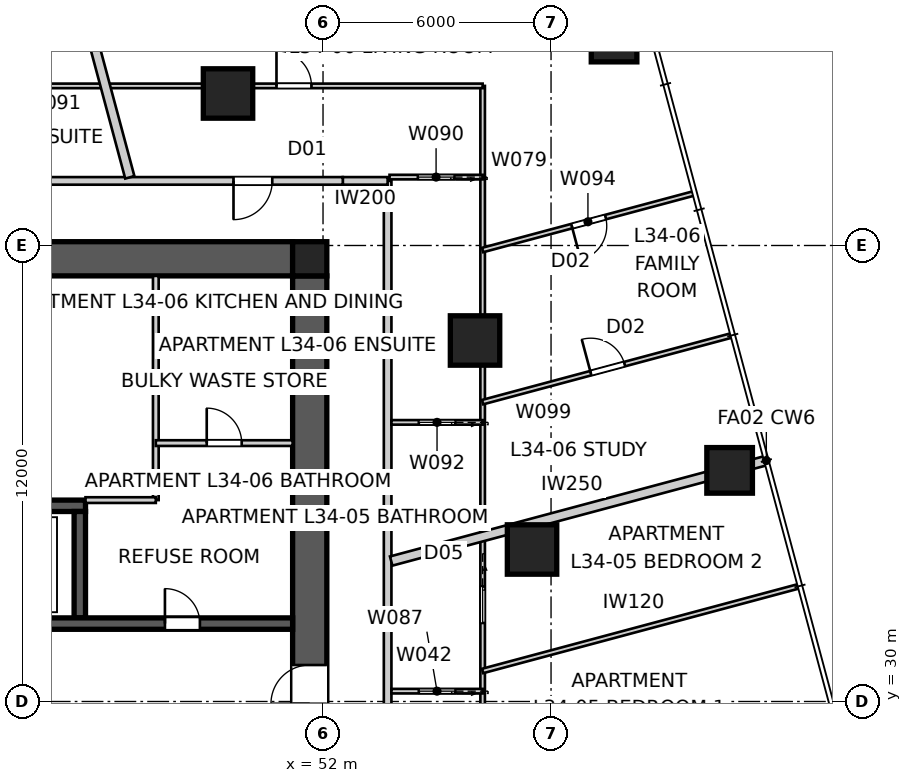
"""IFC4 building model, lengths in metres.
Left out: names, types, materials, properties, quantities, classifications, styles, units other than length and angle.
Written with IfcOpenShell. Run it as: python <this file> out.ifc"""

import sys

from ifc_helpers import new_model, si_unit, direction, frame, frame_2d, origin, origin_2d, place, context, subcontext, project, spatial, polyline, rectangle, outline, extrude, element, fill, save


model = new_model("IFC4")
c1 = context("Model", 3, precision=1e-05, world=origin(), true_north=direction((0.0, 1.0)))
c2 = subcontext(c1, "Body", "Model", "MODEL_VIEW")
j1 = project(units=[si_unit("LENGTHUNIT", "METRE"), si_unit("PLANEANGLEUNIT", "RADIAN")], contexts=[c1])
p1 = place(None, origin())
s1 = spatial("IfcSite", under=j1, at=p1, CompositionType="ELEMENT")
p2 = place(p1, origin())
s2 = spatial("IfcBuilding", under=s1, at=p2, CompositionType="ELEMENT")
p3 = place(p2, frame((0.0, 0.0, 125.2)))
s3 = spatial("IfcBuildingStorey", under=s2, at=p3, CompositionType="ELEMENT", Elevation=125.2)
p4 = place(p3, frame((28.8, 41.65, 0.0), z_axis=(0.0, 0.0, 1.0), x_axis=(1.0, 0.0, 0.0)))
e1 = element("IfcWall", 1, at=p4, inside=s3, PredefinedType="SHEAR", context=c2, shape_type="SweptSolid", body=[
    extrude(outline(polyline([(0.0, -0.45), (22.4, -0.45), (22.4, -0.025), (22.85, -0.025), (22.85, 0.025), (22.4, 0.025), (22.4, 0.45), (0.0, 0.45), (0.0, 0.025), (-0.45, 0.025), (-0.45, -0.025), (0.0, -0.025), (0.0, -0.45)])), origin(), (0.0, 0.0, 1.0), 3.4),
])
p5 = place(p3, frame((51.65, 18.8, 0.0), z_axis=(0.0, 0.0, 1.0), x_axis=(0.0, 1.0, 0.0)))
e2 = element("IfcWall", 2, at=p5, inside=s3, PredefinedType="SHEAR", context=c2, shape_type="SweptSolid", body=[
    extrude(outline(polyline([(0.0, -0.45), (22.4, -0.45), (22.4, -0.025), (22.85, -0.025), (22.85, 0.025), (22.4, 0.025), (22.4, 0.45), (0.0, 0.45), (0.0, 0.025), (-0.45, 0.025), (-0.45, -0.025), (0.0, -0.025), (0.0, -0.45)])), origin(), (0.0, 0.0, 1.0), 3.4),
])
p6 = place(p5, frame((11.14, 0.0, 0.0)))
e3 = element("IfcOpeningElement", 3, at=p6, cuts=e2, PredefinedType="OPENING", context=c2, shape_type="SweptSolid", body=[
    extrude(rectangle(XDim=1.02, YDim=2.4, at=frame_2d((0.51, 1.2))), frame((0.0, 0.46, 0.0), z_axis=(0.0, -1.0, 0.0), x_axis=(1.0, 0.0, 0.0)), (0.0, 0.0, 1.0), 0.92),
])
p7 = place(p3, frame((28.8, 32.05, 0.0), z_axis=(0.0, 0.0, 1.0), x_axis=(1.0, 0.0, 0.0)))
e4 = element("IfcWall", 4, at=p7, inside=s3, PredefinedType="SHEAR", context=c2, shape_type="SweptSolid", body=[
    extrude(rectangle(XDim=22.4, YDim=0.3, at=frame_2d((11.2, 0.0))), origin(), (0.0, 0.0, 1.0), 3.4),
])
p8 = place(p7, frame((19.04, 0.0, 0.0)))
e5 = element("IfcOpeningElement", 5, at=p8, cuts=e4, PredefinedType="OPENING", context=c2, shape_type="SweptSolid", body=[
    extrude(rectangle(XDim=0.92, YDim=2.1, at=frame_2d((0.46, 1.05))), frame((0.0, 0.16, 0.0), z_axis=(0.0, -1.0, 0.0), x_axis=(1.0, 0.0, 0.0)), (0.0, 0.0, 1.0), 0.32),
])
p9 = place(p7, frame((1.265, 0.0, 0.0)))
e6 = element("IfcOpeningElement", 6, at=p9, cuts=e4, PredefinedType="OPENING", context=c2, shape_type="SweptSolid", body=[
    extrude(rectangle(XDim=1.02, YDim=2.1, at=frame_2d((0.51, 1.05))), frame((0.0, 0.16, 0.0), z_axis=(0.0, -1.0, 0.0), x_axis=(1.0, 0.0, 0.0)), (0.0, 0.0, 1.0), 0.32),
])
p10 = place(p7, frame((4.015, 0.0, 0.0)))
e7 = element("IfcOpeningElement", 7, at=p10, cuts=e4, PredefinedType="OPENING", context=c2, shape_type="SweptSolid", body=[
    extrude(rectangle(XDim=0.92, YDim=2.1, at=frame_2d((0.46, 1.05))), frame((0.0, 0.16, 0.0), z_axis=(0.0, -1.0, 0.0), x_axis=(1.0, 0.0, 0.0)), (0.0, 0.0, 1.0), 0.32),
])
p11 = place(p7, frame((6.45, 0.0, 0.0)))
e8 = element("IfcOpeningElement", 8, at=p11, cuts=e4, PredefinedType="OPENING", context=c2, shape_type="SweptSolid", body=[
    extrude(rectangle(XDim=1.1, YDim=2.1, at=frame_2d((0.55, 1.05))), frame((0.0, 0.16, 0.0), z_axis=(0.0, -1.0, 0.0), x_axis=(1.0, 0.0, 0.0)), (0.0, 0.0, 1.0), 0.32),
])
p12 = place(p7, frame((9.25, 0.0, 0.0)))
e9 = element("IfcOpeningElement", 9, at=p12, cuts=e4, PredefinedType="OPENING", context=c2, shape_type="SweptSolid", body=[
    extrude(rectangle(XDim=1.1, YDim=2.1, at=frame_2d((0.55, 1.05))), frame((0.0, 0.16, 0.0), z_axis=(0.0, -1.0, 0.0), x_axis=(1.0, 0.0, 0.0)), (0.0, 0.0, 1.0), 0.32),
])
p13 = place(p7, frame((14.85, 0.0, 0.0)))
e10 = element("IfcOpeningElement", 10, at=p13, cuts=e4, PredefinedType="OPENING", context=c2, shape_type="SweptSolid", body=[
    extrude(rectangle(XDim=1.1, YDim=2.1, at=frame_2d((0.55, 1.05))), frame((0.0, 0.16, 0.0), z_axis=(0.0, -1.0, 0.0), x_axis=(1.0, 0.0, 0.0)), (0.0, 0.0, 1.0), 0.32),
])
p14 = place(p3, frame((34.25, 35.15, 0.0), z_axis=(0.0, 0.0, 1.0), x_axis=(1.0, 0.0, 0.0)))
e11 = element("IfcWall", 11, at=p14, inside=s3, PredefinedType="SHEAR", context=c2, shape_type="SweptSolid", body=[
    extrude(rectangle(XDim=11.5, YDim=0.3, at=frame_2d((5.75, 0.0))), origin(), (0.0, 0.0, 1.0), 3.4),
])
p15 = place(p3, frame((45.6, 32.2, 0.0), z_axis=(0.0, 0.0, 1.0), x_axis=(0.0, 1.0, 0.0)))
e12 = element("IfcWall", 12, at=p15, inside=s3, PredefinedType="SHEAR", context=c2, shape_type="SweptSolid", body=[
    extrude(rectangle(XDim=2.8, YDim=0.3, at=frame_2d((1.4, 0.0))), origin(), (0.0, 0.0, 1.0), 3.4),
])
p16 = place(p3, frame((51.65, 41.65, 0.0), z_axis=(0.0, 0.0, 1.0), x_axis=(1.0, 0.0, 0.0)))
e13 = element("IfcColumn", 13, at=p16, inside=s3, PredefinedType="COLUMN", context=c2, shape_type="SweptSolid", body=[
    extrude(rectangle(XDim=0.9, YDim=0.9, at=origin_2d()), origin(), (0.0, 0.0, 1.0), 3.4),
])
for number, where, z_axis, x_axis in (
    (14, (62.699, 36.082, 0.0), (0.0, 0.0, 1.0), (1.0, 0.0, 0.0)),
    (15, (59.658, 47.432, 0.0), (0.0, 0.0, 1.0), (1.0, 0.0, 0.0)),
):
    element("IfcColumn", number, at=place(p3, frame(where, z_axis=z_axis, x_axis=x_axis)), inside=s3, PredefinedType="COLUMN", context=c2, shape_type="SweptSolid", body=[
        extrude(rectangle(XDim=1.2, YDim=1.2, at=origin_2d()), origin(), (0.0, 0.0, 1.0), 3.4),
    ])
for number, where, z_axis, x_axis in (
    (16, (57.5, 34.0, 0.0), (0.0, 0.0, 1.0), (1.0, 0.0, 0.0)),
    (17, (56.0, 39.5, 0.0), (0.0, 0.0, 1.0), (1.0, 0.0, 0.0)),
    (18, (49.5, 46.0, 0.0), (0.0, 0.0, 1.0), (1.0, 0.0, 0.0)),
):
    element("IfcColumn", number, at=place(p3, frame(where, z_axis=z_axis, x_axis=x_axis)), inside=s3, PredefinedType="COLUMN", context=c2, shape_type="SweptSolid", body=[
        extrude(rectangle(XDim=1.3, YDim=1.3, at=origin_2d()), origin(), (0.0, 0.0, 1.0), 3.4),
    ])
p17 = place(p3, frame((53.7, 17.48, 0.0), z_axis=(0.0, 0.0, 1.0), x_axis=(0.0, 1.0, 0.0)))
e19 = element("IfcWall", 19, at=p17, inside=s3, PredefinedType="PARTITIONING", context=c2, shape_type="SweptSolid", body=[
    extrude(rectangle(XDim=26.22, YDim=0.2, at=frame_2d((13.11, 0.0))), origin(), (0.0, 0.0, 1.0), 3.25),
])
p18 = place(p17, frame((2.252, 0.0, 0.0)))
e20 = element("IfcOpeningElement", 20, at=p18, cuts=e19, PredefinedType="OPENING", context=c2, shape_type="SweptSolid", body=[
    extrude(rectangle(XDim=1.02, YDim=2.34, at=frame_2d((0.51, 1.17))), frame((0.0, 0.11, 0.0), z_axis=(0.0, -1.0, 0.0), x_axis=(1.0, 0.0, 0.0)), (0.0, 0.0, 1.0), 0.22),
])
p19 = place(p17, frame((7.328, 0.0, 0.0)))
e21 = element("IfcOpeningElement", 21, at=p19, cuts=e19, PredefinedType="OPENING", context=c2, shape_type="SweptSolid", body=[
    extrude(rectangle(XDim=1.02, YDim=2.34, at=frame_2d((0.51, 1.17))), frame((0.0, 0.11, 0.0), z_axis=(0.0, -1.0, 0.0), x_axis=(1.0, 0.0, 0.0)), (0.0, 0.0, 1.0), 0.22),
])
p20 = place(p3, frame((53.7, 43.7, 0.0), z_axis=(0.0, 0.0, 1.0), x_axis=(-1.0, 0.0, 0.0)))
e22 = element("IfcWall", 22, at=p20, inside=s3, PredefinedType="PARTITIONING", context=c2, shape_type="SweptSolid", body=[
    extrude(rectangle(XDim=1.18, YDim=0.2, at=frame_2d((0.59, 0.0))), origin(), (0.0, 0.0, 1.0), 2.722),
])
p21 = place(p3, frame((52.52, 43.7, 0.0), z_axis=(0.0, 0.0, 1.0), x_axis=(-1.0, 0.0, 0.0)))
e23 = element("IfcWall", 23, at=p21, inside=s3, PredefinedType="PARTITIONING", context=c2, shape_type="SweptSolid", body=[
    extrude(rectangle(XDim=27.02, YDim=0.2, at=frame_2d((13.51, 0.0))), origin(), (0.0, 0.0, 1.0), 3.25),
])
p22 = place(p21, frame((22.208, 0.0, 0.0)))
e24 = element("IfcOpeningElement", 24, at=p22, cuts=e23, PredefinedType="OPENING", context=c2, shape_type="SweptSolid", body=[
    extrude(rectangle(XDim=1.02, YDim=2.34, at=frame_2d((0.51, 1.17))), frame((0.0, 0.11, 0.0), z_axis=(0.0, -1.0, 0.0), x_axis=(1.0, 0.0, 0.0)), (0.0, 0.0, 1.0), 0.22),
])
p23 = place(p21, frame((1.856, 0.0, 0.0)))
e25 = element("IfcOpeningElement", 25, at=p23, cuts=e23, PredefinedType="OPENING", context=c2, shape_type="SweptSolid", body=[
    extrude(rectangle(XDim=1.02, YDim=2.34, at=frame_2d((0.51, 1.17))), frame((0.0, 0.11, 0.0), z_axis=(0.0, -1.0, 0.0), x_axis=(1.0, 0.0, 0.0)), (0.0, 0.0, 1.0), 0.22),
])
p24 = place(p3, frame((63.665, 36.341, 0.0), z_axis=(0.0, 0.0, 1.0), x_axis=(-0.965927365002, -0.258813302479, 0.0)))
e26 = element("IfcWall", 26, at=p24, inside=s3, PredefinedType="PARTITIONING", context=c2, shape_type="SweptSolid", body=[
    extrude(rectangle(XDim=10.22, YDim=0.25, at=frame_2d((5.11, 0.0))), origin(), (0.0, 0.0, 1.0), 3.25),
])
p25 = place(p3, frame((43.56, 56.318, 0.0), z_axis=(0.0, 0.0, 1.0), x_axis=(0.258822671559, -0.965924854576, 0.0)))
e27 = element("IfcWall", 27, at=p25, inside=s3, PredefinedType="PARTITIONING", context=c2, shape_type="SweptSolid", body=[
    extrude(rectangle(XDim=12.966, YDim=0.25, at=frame_2d((6.483, 0.0))), origin(), (0.0, 0.0, 1.0), 3.25),
])
p26 = place(p3, frame((47.6, 41.2, 0.0), z_axis=(0.0, 0.0, 1.0), x_axis=(0.0, -1.0, 0.0)))
e28 = element("IfcWall", 28, at=p26, inside=s3, PredefinedType="SOLIDWALL", context=c2, shape_type="SweptSolid", body=[
    extrude(rectangle(XDim=5.9, YDim=0.15, at=frame_2d((2.95, 0.0))), origin(), (0.0, 0.0, 1.0), 3.25),
])
p27 = place(p3, frame((47.6, 35.3, 0.0), z_axis=(0.0, 0.0, 1.0), x_axis=(-1.0, 0.0, 0.0)))
e29 = element("IfcWall", 29, at=p27, inside=s3, PredefinedType="SOLIDWALL", context=c2, shape_type="SweptSolid", body=[
    extrude(rectangle(XDim=1.85, YDim=0.15, at=frame_2d((0.925, 0.0))), origin(), (0.0, 0.0, 1.0), 3.25),
])
p28 = place(p3, frame((47.6, 36.8, 0.0), z_axis=(0.0, 0.0, 1.0), x_axis=(1.0, 0.0, 0.0)))
e30 = element("IfcWall", 30, at=p28, inside=s3, PredefinedType="SOLIDWALL", context=c2, shape_type="SweptSolid", body=[
    extrude(rectangle(XDim=3.6, YDim=0.15, at=frame_2d((1.8, 0.0))), origin(), (0.0, 0.0, 1.0), 3.25),
])
p29 = place(p28, frame((1.34, 0.0, 0.0)))
e31 = element("IfcOpeningElement", 31, at=p29, cuts=e30, PredefinedType="OPENING", context=c2, shape_type="SweptSolid", body=[
    extrude(rectangle(XDim=0.92, YDim=2.1, at=frame_2d((0.46, 1.05))), frame((0.0, 0.085, 0.0), z_axis=(0.0, -1.0, 0.0), x_axis=(1.0, 0.0, 0.0)), (0.0, 0.0, 1.0), 0.17),
])
p30 = place(p3, frame((56.2, 46.2, 0.0), z_axis=(0.0, 0.0, 1.0), x_axis=(0.0, -1.0, 0.0)))
e32 = element("IfcWall", 32, at=p30, inside=s3, PredefinedType="PARTITIONING", context=c2, shape_type="SweptSolid", body=[
    extrude(rectangle(XDim=33.2, YDim=0.12, at=frame_2d((16.6, 0.0))), origin(), (0.0, 0.0, 1.0), 2.55),
])
p31 = place(p30, frame((23.955, 0.0, 0.0)))
e33 = element("IfcOpeningElement", 33, at=p31, cuts=e32, PredefinedType="OPENING", context=c2, shape_type="SweptSolid", body=[
    extrude(rectangle(XDim=0.92, YDim=2.34, at=frame_2d((0.46, 1.17))), frame((0.0, 0.07, 0.0), z_axis=(0.0, -1.0, 0.0), x_axis=(1.0, 0.0, 0.0)), (0.0, 0.0, 1.0), 0.14),
])
p32 = place(p30, frame((20.966, 0.0, 0.0)))
e34 = element("IfcOpeningElement", 34, at=p32, cuts=e32, PredefinedType="OPENING", context=c2, shape_type="SweptSolid", body=[
    extrude(rectangle(XDim=0.92, YDim=2.34, at=frame_2d((0.46, 1.17))), frame((0.0, 0.07, 0.0), z_axis=(0.0, -1.0, 0.0), x_axis=(1.0, 0.0, 0.0)), (0.0, 0.0, 1.0), 0.14),
])
p33 = place(p30, frame((13.174, 0.0, 0.0)))
e35 = element("IfcOpeningElement", 35, at=p33, cuts=e32, PredefinedType="OPENING", context=c2, shape_type="SweptSolid", body=[
    extrude(rectangle(XDim=0.96, YDim=2.1, at=frame_2d((0.48, 1.05))), frame((0.0, 0.07, 0.0), z_axis=(0.0, -1.0, 0.0), x_axis=(1.0, 0.0, 0.0)), (0.0, 0.0, 1.0), 0.14),
])
p34 = place(p3, frame((56.2, 30.272, 0.0), z_axis=(0.0, 0.0, 1.0), x_axis=(-1.0, 0.0, 0.0)))
e36 = element("IfcWall", 36, at=p34, inside=s3, PredefinedType="PARTITIONING", context=c2, shape_type="SweptSolid", body=[
    extrude(rectangle(XDim=2.4, YDim=0.12, at=frame_2d((1.2, 0.0))), origin(), (0.0, 0.0, 1.0), 3.25),
])
p35 = place(p34, frame((0.72, 0.0, 0.0)))
e37 = element("IfcOpeningElement", 37, at=p35, cuts=e36, PredefinedType="OPENING", context=c2, shape_type="SweptSolid", body=[
    extrude(rectangle(XDim=0.96, YDim=2.1, at=frame_2d((0.48, 1.05))), frame((0.0, 0.07, 0.0), z_axis=(0.0, -1.0, 0.0), x_axis=(1.0, 0.0, 0.0)), (0.0, 0.0, 1.0), 0.14),
])
p36 = place(p3, frame((56.2, 30.803, 0.0), z_axis=(0.0, 0.0, 1.0), x_axis=(0.965920565748, 0.258838676912, 0.0)))
e38 = element("IfcWall", 38, at=p36, inside=s3, PredefinedType="PARTITIONING", context=c2, shape_type="SweptSolid", body=[
    extrude(rectangle(XDim=8.604, YDim=0.12, at=frame_2d((4.302, 0.0))), origin(), (0.0, 0.0, 1.0), 3.25),
])
p37 = place(p3, frame((56.2, 43.8, 0.0), z_axis=(0.0, 0.0, 1.0), x_axis=(-1.0, 0.0, 0.0)))
e39 = element("IfcWall", 39, at=p37, inside=s3, PredefinedType="PARTITIONING", context=c2, shape_type="SweptSolid", body=[
    extrude(rectangle(XDim=2.45, YDim=0.12, at=frame_2d((1.225, 0.0))), origin(), (0.0, 0.0, 1.0), 2.722),
])
p38 = place(p37, frame((0.745, 0.0, 0.0)))
e40 = element("IfcOpeningElement", 40, at=p38, cuts=e39, PredefinedType="OPENING", context=c2, shape_type="SweptSolid", body=[
    extrude(rectangle(XDim=0.96, YDim=2.1, at=frame_2d((0.48, 1.05))), frame((0.0, 0.07, 0.0), z_axis=(0.0, -1.0, 0.0), x_axis=(1.0, 0.0, 0.0)), (0.0, 0.0, 1.0), 0.14),
])
p39 = place(p3, frame((23.0, 46.2, 0.0), z_axis=(0.0, 0.0, 1.0), x_axis=(1.0, 0.0, 0.0)))
e41 = element("IfcWall", 41, at=p39, inside=s3, PredefinedType="PARTITIONING", context=c2, shape_type="SweptSolid", body=[
    extrude(rectangle(XDim=33.2, YDim=0.12, at=frame_2d((16.6, 0.0))), origin(), (0.0, 0.0, 1.0), 2.55),
])
p40 = place(p39, frame((5.844, 0.0, 0.0)))
e42 = element("IfcOpeningElement", 42, at=p40, cuts=e41, PredefinedType="OPENING", context=c2, shape_type="SweptSolid", body=[
    extrude(rectangle(XDim=0.92, YDim=2.34, at=frame_2d((0.46, 1.17))), frame((0.0, 0.07, 0.0), z_axis=(0.0, -1.0, 0.0), x_axis=(1.0, 0.0, 0.0)), (0.0, 0.0, 1.0), 0.14),
])
p41 = place(p39, frame((3.382, 0.0, 0.0)))
e43 = element("IfcOpeningElement", 43, at=p41, cuts=e41, PredefinedType="OPENING", context=c2, shape_type="SweptSolid", body=[
    extrude(rectangle(XDim=0.92, YDim=2.34, at=frame_2d((0.46, 1.17))), frame((0.0, 0.07, 0.0), z_axis=(0.0, -1.0, 0.0), x_axis=(1.0, 0.0, 0.0)), (0.0, 0.0, 1.0), 0.14),
])
p42 = place(p39, frame((9.452, 0.0, 0.0)))
e44 = element("IfcOpeningElement", 44, at=p42, cuts=e41, PredefinedType="OPENING", context=c2, shape_type="SweptSolid", body=[
    extrude(rectangle(XDim=0.92, YDim=2.34, at=frame_2d((0.46, 1.17))), frame((0.0, 0.07, 0.0), z_axis=(0.0, -1.0, 0.0), x_axis=(1.0, 0.0, 0.0)), (0.0, 0.0, 1.0), 0.14),
])
p43 = place(p39, frame((27.775, 0.0, 0.0)))
e45 = element("IfcOpeningElement", 45, at=p43, cuts=e41, PredefinedType="OPENING", context=c2, shape_type="SweptSolid", body=[
    extrude(rectangle(XDim=0.92, YDim=2.34, at=frame_2d((0.46, 1.17))), frame((0.0, 0.07, 0.0), z_axis=(0.0, -1.0, 0.0), x_axis=(1.0, 0.0, 0.0)), (0.0, 0.0, 1.0), 0.14),
])
p44 = place(p39, frame((15.05, 0.0, 0.0)))
e46 = element("IfcOpeningElement", 46, at=p44, cuts=e41, PredefinedType="OPENING", context=c2, shape_type="SweptSolid", body=[
    extrude(rectangle(XDim=0.96, YDim=2.1, at=frame_2d((0.48, 1.05))), frame((0.0, 0.07, 0.0), z_axis=(0.0, -1.0, 0.0), x_axis=(1.0, 0.0, 0.0)), (0.0, 0.0, 1.0), 0.14),
])
p45 = place(p3, frame((56.2, 37.345, 0.0), z_axis=(0.0, 0.0, 1.0), x_axis=(-1.0, 0.0, 0.0)))
e47 = element("IfcWall", 47, at=p45, inside=s3, PredefinedType="PARTITIONING", context=c2, shape_type="SweptSolid", body=[
    extrude(rectangle(XDim=2.4, YDim=0.12, at=frame_2d((1.2, 0.0))), origin(), (0.0, 0.0, 1.0), 3.25),
])
p46 = place(p45, frame((0.72, 0.0, 0.0)))
e48 = element("IfcOpeningElement", 48, at=p46, cuts=e47, PredefinedType="OPENING", context=c2, shape_type="SweptSolid", body=[
    extrude(rectangle(XDim=0.96, YDim=2.1, at=frame_2d((0.48, 1.05))), frame((0.0, 0.07, 0.0), z_axis=(0.0, -1.0, 0.0), x_axis=(1.0, 0.0, 0.0)), (0.0, 0.0, 1.0), 0.14),
])
p47 = place(p3, frame((61.741, 43.366, 0.0), z_axis=(0.0, 0.0, 1.0), x_axis=(-0.965924876974, -0.25882258797, 0.0)))
e49 = element("IfcWall", 49, at=p47, inside=s3, PredefinedType="PARTITIONING", context=c2, shape_type="SweptSolid", body=[
    extrude(rectangle(XDim=5.737, YDim=0.12, at=frame_2d((2.869, 0.0))), origin(), (0.0, 0.0, 1.0), 3.25),
])
p48 = place(p47, frame((2.388, 0.0, 0.0)))
e50 = element("IfcOpeningElement", 50, at=p48, cuts=e49, PredefinedType="OPENING", context=c2, shape_type="SweptSolid", body=[
    extrude(rectangle(XDim=0.92, YDim=2.34, at=frame_2d((0.46, 1.17))), frame((0.0, 0.07, 0.0), z_axis=(0.0, -1.0, 0.0), x_axis=(1.0, 0.0, 0.0)), (0.0, 0.0, 1.0), 0.14),
])
p49 = place(p3, frame((56.2, 37.878, 0.0), z_axis=(0.0, 0.0, 1.0), x_axis=(0.96591892777, 0.258844789354, 0.0)))
e51 = element("IfcWall", 51, at=p49, inside=s3, PredefinedType="PARTITIONING", context=c2, shape_type="SweptSolid", body=[
    extrude(rectangle(XDim=6.773, YDim=0.12, at=frame_2d((3.386, 0.0))), origin(), (0.0, 0.0, 1.0), 3.25),
])
p50 = place(p49, frame((2.947, 0.0, 0.0)))
e52 = element("IfcOpeningElement", 52, at=p50, cuts=e51, PredefinedType="OPENING", context=c2, shape_type="SweptSolid", body=[
    extrude(rectangle(XDim=0.92, YDim=2.34, at=frame_2d((0.46, 1.17))), frame((0.0, 0.07, 0.0), z_axis=(0.0, -1.0, 0.0), x_axis=(1.0, 0.0, 0.0)), (0.0, 0.0, 1.0), 0.14),
])
p51 = place(p8, origin())
e53 = element("IfcDoor", 53, at=p51, inside=s3, OperationType="SINGLE_SWING_LEFT", PredefinedType="DOOR", context=c2, shape_type="SweptSolid", body=[
    extrude(rectangle(XDim=0.92, YDim=2.1, at=frame_2d((0.46, 1.05))), frame((0.0, 0.025, 0.0), z_axis=(0.0, -1.0, 0.0), x_axis=(1.0, 0.0, 0.0)), (0.0, 0.0, 1.0), 0.05),
])
fill(e5, e53)
p52 = place(p23, origin())
e54 = element("IfcDoor", 54, at=p52, inside=s3, OperationType="SINGLE_SWING_RIGHT", PredefinedType="DOOR", context=c2, shape_type="SweptSolid", body=[
    extrude(rectangle(XDim=1.02, YDim=2.34, at=frame_2d((0.51, 1.17))), frame((0.0, 0.025, 0.0), z_axis=(0.0, -1.0, 0.0), x_axis=(1.0, 0.0, 0.0)), (0.0, 0.0, 1.0), 0.05),
])
fill(e25, e54)
p53 = place(p29, origin())
e55 = element("IfcDoor", 55, at=p53, inside=s3, OperationType="SINGLE_SWING_LEFT", PredefinedType="DOOR", context=c2, shape_type="SweptSolid", body=[
    extrude(rectangle(XDim=0.92, YDim=2.1, at=frame_2d((0.46, 1.05))), frame((0.0, 0.025, 0.0), z_axis=(0.0, -1.0, 0.0), x_axis=(1.0, 0.0, 0.0)), (0.0, 0.0, 1.0), 0.05),
])
fill(e31, e55)
p54 = place(p43, origin())
e56 = element("IfcDoor", 56, at=p54, inside=s3, OperationType="SINGLE_SWING_LEFT", PredefinedType="DOOR", context=c2, shape_type="SweptSolid", body=[
    extrude(rectangle(XDim=0.92, YDim=2.34, at=frame_2d((0.46, 1.17))), frame((0.0, 0.025, 0.0), z_axis=(0.0, -1.0, 0.0), x_axis=(1.0, 0.0, 0.0)), (0.0, 0.0, 1.0), 0.05),
])
fill(e45, e56)
p55 = place(p38, origin())
e57 = element("IfcDoor", 57, at=p55, inside=s3, OperationType="SLIDING_TO_LEFT", PredefinedType="DOOR", context=c2, shape_type="SweptSolid", body=[
    extrude(rectangle(XDim=0.96, YDim=2.1, at=frame_2d((0.48, 1.05))), frame((0.0, 0.025, 0.0), z_axis=(0.0, -1.0, 0.0), x_axis=(1.0, 0.0, 0.0)), (0.0, 0.0, 1.0), 0.05),
])
fill(e40, e57)
p56 = place(p48, origin())
e58 = element("IfcDoor", 58, at=p56, inside=s3, OperationType="SINGLE_SWING_RIGHT", PredefinedType="DOOR", context=c2, shape_type="SweptSolid", body=[
    extrude(rectangle(XDim=0.92, YDim=2.34, at=frame_2d((0.46, 1.17))), frame((0.0, 0.025, 0.0), z_axis=(0.0, -1.0, 0.0), x_axis=(1.0, 0.0, 0.0)), (0.0, 0.0, 1.0), 0.05),
])
fill(e50, e58)
p57 = place(p46, origin())
e59 = element("IfcDoor", 59, at=p57, inside=s3, OperationType="SLIDING_TO_LEFT", PredefinedType="DOOR", context=c2, shape_type="SweptSolid", body=[
    extrude(rectangle(XDim=0.96, YDim=2.1, at=frame_2d((0.48, 1.05))), frame((0.0, 0.025, 0.0), z_axis=(0.0, -1.0, 0.0), x_axis=(1.0, 0.0, 0.0)), (0.0, 0.0, 1.0), 0.05),
])
fill(e48, e59)
p58 = place(p35, origin())
e60 = element("IfcDoor", 60, at=p58, inside=s3, OperationType="SLIDING_TO_LEFT", PredefinedType="DOOR", context=c2, shape_type="SweptSolid", body=[
    extrude(rectangle(XDim=0.96, YDim=2.1, at=frame_2d((0.48, 1.05))), frame((0.0, 0.025, 0.0), z_axis=(0.0, -1.0, 0.0), x_axis=(1.0, 0.0, 0.0)), (0.0, 0.0, 1.0), 0.05),
])
fill(e37, e60)
p59 = place(p50, origin())
e61 = element("IfcDoor", 61, at=p59, inside=s3, OperationType="SINGLE_SWING_LEFT", PredefinedType="DOOR", context=c2, shape_type="SweptSolid", body=[
    extrude(rectangle(XDim=0.92, YDim=2.34, at=frame_2d((0.46, 1.17))), frame((0.0, 0.025, 0.0), z_axis=(0.0, -1.0, 0.0), x_axis=(1.0, 0.0, 0.0)), (0.0, 0.0, 1.0), 0.05),
])
fill(e52, e61)
p60 = place(p33, origin())
e62 = element("IfcDoor", 62, at=p60, inside=s3, OperationType="SLIDING_TO_LEFT", PredefinedType="DOOR", context=c2, shape_type="SweptSolid", body=[
    extrude(rectangle(XDim=0.96, YDim=2.1, at=frame_2d((0.48, 1.05))), frame((0.0, 0.025, 0.0), z_axis=(0.0, -1.0, 0.0), x_axis=(1.0, 0.0, 0.0)), (0.0, 0.0, 1.0), 0.05),
])
fill(e35, e62)
p61 = place(p6, origin())
e63 = element("IfcDoor", 63, at=p61, inside=s3, OperationType="SINGLE_SWING_LEFT", PredefinedType="DOOR", context=c2, shape_type="SweptSolid", body=[
    extrude(rectangle(XDim=1.02, YDim=2.4, at=frame_2d((0.51, 1.2))), frame((0.0, 0.025, 0.0), z_axis=(0.0, -1.0, 0.0), x_axis=(1.0, 0.0, 0.0)), (0.0, 0.0, 1.0), 0.05),
])
fill(e3, e63)
save(model, sys.argv[1])
